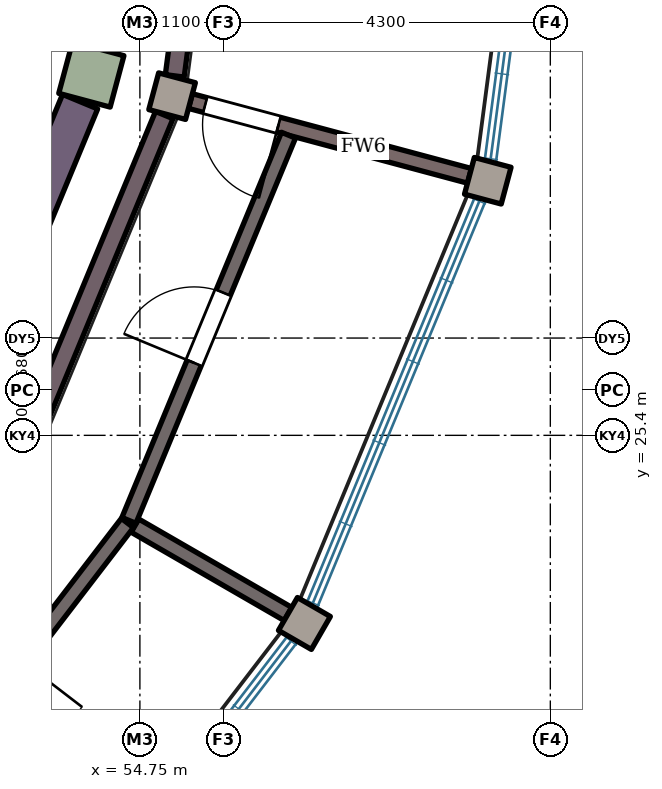
"""IFC4 building model, lengths in metres.
Left out: names, types, materials, properties, quantities, classifications, styles, units other than length and angle.
Written with IfcOpenShell. Run it as: python <this file> out.ifc"""

import sys

from ifc_helpers import new_model, si_unit, direction, frame, frame_2d, origin, origin_2d, place, context, subcontext, project, spatial, rectangle, extrude, element, fill, save


model = new_model("IFC4")
c1 = context("Model", 3, precision=1e-05, world=origin(), true_north=direction((0.0, 1.0)))
c2 = subcontext(c1, "Body", "Model", "MODEL_VIEW")
j1 = project(units=[si_unit("LENGTHUNIT", "METRE"), si_unit("PLANEANGLEUNIT", "RADIAN")], contexts=[c1])
p1 = place(None, origin())
s1 = spatial("IfcSite", under=j1, at=p1, CompositionType="ELEMENT")
p2 = place(p1, origin())
s2 = spatial("IfcBuilding", under=s1, at=p2, CompositionType="ELEMENT")
p3 = place(p2, frame((0.0, 0.0, 4.2)))
s3 = spatial("IfcBuildingStorey", under=s2, at=p3, CompositionType="ELEMENT", Elevation=4.2)
p4 = place(p3, frame((54.111, 30.147, 0.0), z_axis=(0.0, 0.0, 1.0), x_axis=(0.258819045103, 0.965925826289, 0.0)))
e1 = element("IfcColumn", 1, at=p4, inside=s3, PredefinedType="COLUMN", context=c2, shape_type="SweptSolid", body=[
    extrude(rectangle(XDim=0.7, YDim=0.7, at=origin_2d()), origin(), (0.0, 0.0, 1.0), 4.2),
])
p5 = place(p3, frame((52.386, 25.982, 0.0), z_axis=(0.0, 0.0, 1.0), x_axis=(0.382688328955, 0.923877504262, 0.0)))
e2 = element("IfcWall", 2, at=p5, inside=s3, PredefinedType="SHEAR", context=c2, shape_type="SweptSolid", body=[
    extrude(rectangle(XDim=4.122, YDim=0.5, at=frame_2d((2.061, 0.0))), origin(), (0.0, 0.0, 1.0), 3.4),
])
for number, where, z_axis, x_axis in (
    (3, (55.174, 29.863, 0.0), (0.0, 0.0, 1.0), (0.259, 0.966, 0.0)),
    (4, (56.915, 22.925, 0.0), (0.0, 0.0, 1.0), (0.5, 0.866, 0.0)),
    (5, (59.327, 28.75, 0.0), (0.0, 0.0, 1.0), (0.259, 0.966, 0.0)),
):
    element("IfcColumn", number, at=place(p3, frame(where, z_axis=z_axis, x_axis=x_axis)), inside=s3, PredefinedType="COLUMN", context=c2, shape_type="SweptSolid", body=[
        extrude(rectangle(XDim=0.5, YDim=0.5, at=origin_2d()), origin(), (0.0, 0.0, 1.0), 4.2),
    ])
p6 = place(p3, frame((53.294, 25.324, 0.0), z_axis=(0.0, 0.0, 1.0), x_axis=(0.382658268537, 0.923889955309, 0.0)))
e6 = element("IfcWall", 6, at=p6, inside=s3, PredefinedType="SHEAR", context=c2, shape_type="SweptSolid", body=[
    extrude(rectangle(XDim=4.644, YDim=0.25, at=frame_2d((2.322, 0.0))), origin(), (0.0, 0.0, 1.0), 3.6),
])
p7 = place(p3, frame((55.209, 30.129, 0.0), z_axis=(0.0, 0.0, 1.0), x_axis=(0.130541551055, 0.991442839224, 0.0)))
e7 = element("IfcWall", 7, at=p7, inside=s3, PredefinedType="SHEAR", context=c2, shape_type="SweptSolid", body=[
    extrude(rectangle(XDim=4.644, YDim=0.25, at=frame_2d((2.322, 0.0))), origin(), (0.0, 0.0, 1.0), 3.6),
])
p8 = place(p3, frame((54.685, 24.212, 0.0), z_axis=(0.0, 0.0, 1.0), x_axis=(0.866056135553, -0.499946767237, 0.0)))
e8 = element("IfcWall", 8, at=p8, inside=s3, PredefinedType="PARTITIONING", context=c2, shape_type="SweptSolid", body=[
    extrude(rectangle(XDim=2.324, YDim=0.2, at=frame_2d((1.162, 0.0))), origin(), (0.0, 0.0, 1.0), 3.95),
])
p9 = place(p3, frame((55.415, 29.798, 0.0), z_axis=(0.0, 0.0, 1.0), x_axis=(0.965919660258, -0.258842055948, 0.0)))
e9 = element("IfcWall", 9, at=p9, inside=s3, PredefinedType="STANDARD", context=c2, shape_type="SweptSolid", body=[
    extrude(rectangle(XDim=3.8, YDim=0.2, at=frame_2d((1.9, 0.0))), origin(), (0.0, 0.0, 1.0), 3.95),
])
p10 = place(p9, frame((0.2, 0.0, 0.0)))
e10 = element("IfcOpeningElement", 10, at=p10, cuts=e9, PredefinedType="OPENING", context=c2, shape_type="SweptSolid", body=[
    extrude(rectangle(XDim=1.0, YDim=2.1, at=frame_2d((0.5, 1.05))), frame((0.0, 0.11, 0.0), z_axis=(0.0, -1.0, 0.0), x_axis=(1.0, 0.0, 0.0)), (0.0, 0.0, 1.0), 0.22),
])
p11 = place(p3, frame((51.197, 19.831, 0.0), z_axis=(0.0, 0.0, 1.0), x_axis=(0.608771278496, 0.793345782417, 0.0)))
e11 = element("IfcWall", 11, at=p11, inside=s3, PredefinedType="PARTITIONING", context=c2, shape_type="SweptSolid", body=[
    extrude(rectangle(XDim=5.566, YDim=0.2, at=frame_2d((2.783, 0.0))), origin(), (0.0, 0.0, 1.0), 3.95),
])
p12 = place(p11, frame((2.283, 0.0, 0.0)))
e12 = element("IfcOpeningElement", 12, at=p12, cuts=e11, PredefinedType="OPENING", context=c2, shape_type="SweptSolid", body=[
    extrude(rectangle(XDim=1.0, YDim=2.1, at=frame_2d((0.5, 1.05))), frame((0.0, 0.11, 0.0), z_axis=(0.0, -1.0, 0.0), x_axis=(1.0, 0.0, 0.0)), (0.0, 0.0, 1.0), 0.22),
])
p13 = place(p3, frame((54.605, 24.281, 0.0), z_axis=(0.0, 0.0, 1.0), x_axis=(0.382696372992, 0.923874172222, 0.0)))
e13 = element("IfcWall", 13, at=p13, inside=s3, PredefinedType="PARTITIONING", context=c2, shape_type="SweptSolid", body=[
    extrude(rectangle(XDim=5.486, YDim=0.2, at=frame_2d((2.743, 0.0))), origin(), (0.0, 0.0, 1.0), 3.95),
])
p14 = place(p13, frame((2.243, 0.0, 0.0)))
e14 = element("IfcOpeningElement", 14, at=p14, cuts=e13, PredefinedType="OPENING", context=c2, shape_type="SweptSolid", body=[
    extrude(rectangle(XDim=1.0, YDim=2.1, at=frame_2d((0.5, 1.05))), frame((0.0, 0.11, 0.0), z_axis=(0.0, -1.0, 0.0), x_axis=(1.0, 0.0, 0.0)), (0.0, 0.0, 1.0), 0.22),
])
p15 = place(p10, origin())
e15 = element("IfcDoor", 15, at=p15, inside=s3, OperationType="SINGLE_SWING_RIGHT", PredefinedType="DOOR", context=c2, shape_type="SweptSolid", body=[
    extrude(rectangle(XDim=1.0, YDim=2.1, at=frame_2d((0.5, 1.05))), frame((0.0, 0.025, 0.0), z_axis=(0.0, -1.0, 0.0), x_axis=(1.0, 0.0, 0.0)), (0.0, 0.0, 1.0), 0.05),
])
fill(e10, e15)
p16 = place(p14, origin())
e16 = element("IfcDoor", 16, at=p16, inside=s3, OperationType="SINGLE_SWING_LEFT", PredefinedType="DOOR", context=c2, shape_type="SweptSolid", body=[
    extrude(rectangle(XDim=1.0, YDim=2.1, at=frame_2d((0.5, 1.05))), frame((0.0, 0.025, 0.0), z_axis=(0.0, -1.0, 0.0), x_axis=(1.0, 0.0, 0.0)), (0.0, 0.0, 1.0), 0.05),
])
fill(e14, e16)
save(model, sys.argv[1])
